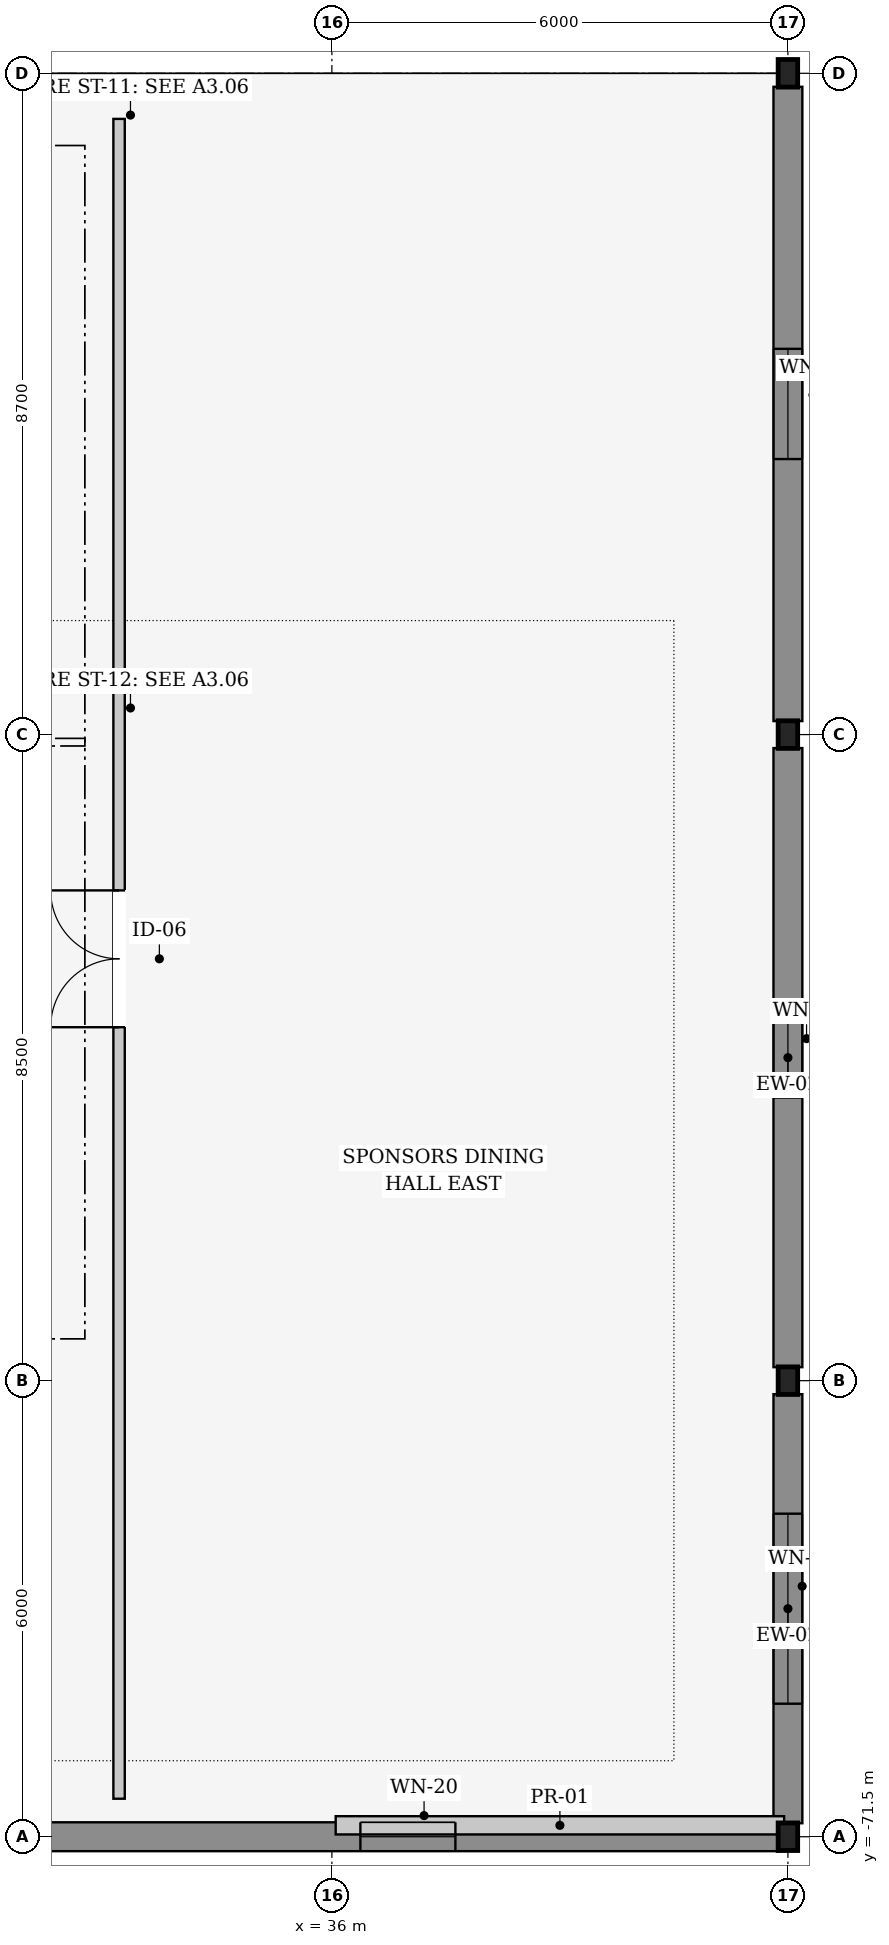
"""IFC4 building model, lengths in metres.
Left out: names, types, materials, properties, quantities, classifications, styles, units other than length and angle.
Written with IfcOpenShell. Run it as: python <this file> out.ifc"""

import sys

from ifc_helpers import new_model, si_unit, direction, frame, frame_2d, origin, origin_2d, place, context, subcontext, project, spatial, rectangle, i_section, extrude, element, fill, save


model = new_model("IFC4")
c1 = context("Model", 3, precision=1e-05, world=origin(), true_north=direction((0.0, 1.0)))
c2 = subcontext(c1, "Body", "Model", "MODEL_VIEW")
j1 = project(units=[si_unit("LENGTHUNIT", "METRE"), si_unit("PLANEANGLEUNIT", "RADIAN")], contexts=[c1])
p1 = place(None, origin())
s1 = spatial("IfcSite", under=j1, at=p1, CompositionType="ELEMENT")
p2 = place(p1, origin())
s2 = spatial("IfcBuilding", under=s1, at=p2, CompositionType="ELEMENT")
p3 = place(p2, frame((0.0, 0.0, 11.4)))
s3 = spatial("IfcBuildingStorey", under=s2, at=p3, CompositionType="ELEMENT", Elevation=11.4)
for number, where, z_axis, x_axis in (
    (1, (42.0, -71.5, 0.0), (0.0, 0.0, 1.0), (1.0, 0.0, 0.0)),
    (2, (42.0, -65.5, 0.0), (0.0, 0.0, 1.0), (1.0, 0.0, 0.0)),
    (3, (42.0, -57.0, 0.0), (0.0, 0.0, 1.0), (1.0, 0.0, 0.0)),
    (4, (42.0, -48.3, 0.0), (0.0, 0.0, 1.0), (1.0, 0.0, 0.0)),
):
    element("IfcColumn", number, at=place(p3, frame(where, z_axis=z_axis, x_axis=x_axis)), inside=s3, PredefinedType="COLUMN", context=c2, shape_type="SweptSolid", body=[
        extrude(i_section(OverallWidth=0.257, OverallDepth=0.363, WebThickness=0.013, FlangeThickness=0.022, at=origin_2d()), origin(), (0.0, 0.0, 1.0), 4.8),
    ])
p4 = place(p3, frame((42.0, -65.677, 0.0), z_axis=(0.0, 0.0, 1.0), x_axis=(0.0, -1.0, 0.0)))
e5 = element("IfcWall", 5, at=p4, inside=s3, PredefinedType="SOLIDWALL", context=c2, shape_type="SweptSolid", body=[
    extrude(rectangle(XDim=5.645, YDim=0.38, at=frame_2d((2.823, 0.0))), origin(), (0.0, 0.0, 1.0), 3.66),
])
p5 = place(p4, frame((1.573, 0.0, 0.95)))
e6 = element("IfcOpeningElement", 6, at=p5, cuts=e5, PredefinedType="OPENING", context=c2, shape_type="SweptSolid", body=[
    extrude(rectangle(XDim=2.5, YDim=1.25, at=frame_2d((1.25, 0.625))), frame((0.0, 0.2, 0.0), z_axis=(0.0, -1.0, 0.0), x_axis=(1.0, 0.0, 0.0)), (0.0, 0.0, 1.0), 0.4),
])
p6 = place(p3, frame((42.0, -57.177, 0.0), z_axis=(0.0, 0.0, 1.0), x_axis=(0.0, -1.0, 0.0)))
e7 = element("IfcWall", 7, at=p6, inside=s3, PredefinedType="SOLIDWALL", context=c2, shape_type="SweptSolid", body=[
    extrude(rectangle(XDim=8.145, YDim=0.38, at=frame_2d((4.073, 0.0))), origin(), (0.0, 0.0, 1.0), 3.66),
])
p7 = place(p6, frame((3.548, 0.0, 0.95)))
e8 = element("IfcOpeningElement", 8, at=p7, cuts=e7, PredefinedType="OPENING", context=c2, shape_type="SweptSolid", body=[
    extrude(rectangle(XDim=1.05, YDim=1.5, at=frame_2d((0.525, 0.75))), frame((0.0, 0.2, 0.0), z_axis=(0.0, -1.0, 0.0), x_axis=(1.0, 0.0, 0.0)), (0.0, 0.0, 1.0), 0.4),
])
p8 = place(p3, frame((42.0, -48.478, 0.0), z_axis=(0.0, 0.0, 1.0), x_axis=(0.0, -1.0, 0.0)))
e9 = element("IfcWall", 9, at=p8, inside=s3, PredefinedType="SOLIDWALL", context=c2, shape_type="SweptSolid", body=[
    extrude(rectangle(XDim=8.345, YDim=0.38, at=frame_2d((4.172, 0.0))), origin(), (0.0, 0.0, 1.0), 3.66),
])
p9 = place(p8, frame((3.448, 0.0, 0.95)))
e10 = element("IfcOpeningElement", 10, at=p9, cuts=e9, PredefinedType="OPENING", context=c2, shape_type="SweptSolid", body=[
    extrude(rectangle(XDim=1.45, YDim=1.5, at=frame_2d((0.725, 0.75))), frame((0.0, 0.2, 0.0), z_axis=(0.0, -1.0, 0.0), x_axis=(1.0, 0.0, 0.0)), (0.0, 0.0, 1.0), 0.4),
])
p10 = place(p3, frame((41.875, -71.5, 0.0), z_axis=(0.0, 0.0, 1.0), x_axis=(-1.0, 0.0, 0.0)))
e11 = element("IfcWall", 11, at=p10, inside=s3, PredefinedType="SOLIDWALL", context=c2, shape_type="SweptSolid", body=[
    extrude(rectangle(XDim=9.751, YDim=0.38, at=frame_2d((4.875, 0.0))), origin(), (0.0, 0.0, 1.0), 3.66),
])
p11 = place(p10, frame((4.25, 0.0, 0.9)))
e12 = element("IfcOpeningElement", 12, at=p11, cuts=e11, PredefinedType="OPENING", context=c2, shape_type="SweptSolid", body=[
    extrude(rectangle(XDim=1.25, YDim=1.75, at=frame_2d((0.625, 0.875))), frame((0.0, 0.2, 0.0), z_axis=(0.0, -1.0, 0.0), x_axis=(1.0, 0.0, 0.0)), (0.0, 0.0, 1.0), 0.4),
])
p12 = place(p3, frame((36.05, -71.35, 4.75), z_axis=(0.0, 0.0, 1.0), x_axis=(1.0, 0.0, 0.0)))
e13 = element("IfcWall", 13, at=p12, inside=s3, PredefinedType="PARAPET", context=c2, shape_type="SweptSolid", body=[
    extrude(rectangle(XDim=5.9, YDim=0.24, at=frame_2d((2.95, 0.0))), origin(), (0.0, 0.0, 1.0), 1.15),
])
p13 = place(p3, frame((33.2, -71.0, 0.0), z_axis=(0.0, 0.0, 1.0), x_axis=(0.0, 1.0, 0.0)))
e14 = element("IfcWall", 14, at=p13, inside=s3, PredefinedType="PARTITIONING", context=c2, shape_type="SweptSolid", body=[
    extrude(rectangle(XDim=22.1, YDim=0.15, at=frame_2d((11.05, 0.0))), origin(), (0.0, 0.0, 1.0), 3.645),
])
p14 = place(p13, frame((10.15, 0.0, 0.0)))
e15 = element("IfcOpeningElement", 15, at=p14, cuts=e14, PredefinedType="OPENING", context=c2, shape_type="SweptSolid", body=[
    extrude(rectangle(XDim=1.8, YDim=2.2, at=frame_2d((0.9, 1.1))), frame((0.0, 0.085, 0.0), z_axis=(0.0, -1.0, 0.0), x_axis=(1.0, 0.0, 0.0)), (0.0, 0.0, 1.0), 0.17),
])
p15 = place(p5, origin())
e16 = element("IfcWindow", 16, at=p15, inside=s3, PartitioningType="SINGLE_PANEL", PredefinedType="WINDOW", context=c2, shape_type="SweptSolid", body=[
    extrude(rectangle(XDim=2.5, YDim=1.25, at=frame_2d((1.25, 0.625))), frame((0.0, 0.03, 0.0), z_axis=(0.0, -1.0, 0.0), x_axis=(1.0, 0.0, 0.0)), (0.0, 0.0, 1.0), 0.06),
])
fill(e6, e16)
p16 = place(p7, origin())
e17 = element("IfcWindow", 17, at=p16, inside=s3, PartitioningType="SINGLE_PANEL", PredefinedType="WINDOW", context=c2, shape_type="SweptSolid", body=[
    extrude(rectangle(XDim=1.05, YDim=1.5, at=frame_2d((0.525, 0.75))), frame((0.0, 0.03, 0.0), z_axis=(0.0, -1.0, 0.0), x_axis=(1.0, 0.0, 0.0)), (0.0, 0.0, 1.0), 0.06),
])
fill(e8, e17)
p17 = place(p9, origin())
e18 = element("IfcWindow", 18, at=p17, inside=s3, PartitioningType="SINGLE_PANEL", PredefinedType="WINDOW", context=c2, shape_type="SweptSolid", body=[
    extrude(rectangle(XDim=1.45, YDim=1.5, at=frame_2d((0.725, 0.75))), frame((0.0, 0.03, 0.0), z_axis=(0.0, -1.0, 0.0), x_axis=(1.0, 0.0, 0.0)), (0.0, 0.0, 1.0), 0.06),
])
fill(e10, e18)
p18 = place(p11, origin())
e19 = element("IfcWindow", 19, at=p18, inside=s3, PartitioningType="SINGLE_PANEL", PredefinedType="WINDOW", context=c2, shape_type="SweptSolid", body=[
    extrude(rectangle(XDim=1.25, YDim=1.75, at=frame_2d((0.625, 0.875))), frame((0.0, 0.03, 0.0), z_axis=(0.0, -1.0, 0.0), x_axis=(1.0, 0.0, 0.0)), (0.0, 0.0, 1.0), 0.06),
])
fill(e12, e19)
p19 = place(p14, origin())
e20 = element("IfcDoor", 20, at=p19, inside=s3, OperationType="DOUBLE_DOOR_SINGLE_SWING", PredefinedType="DOOR", context=c2, shape_type="SweptSolid", body=[
    extrude(rectangle(XDim=1.8, YDim=2.2, at=frame_2d((0.9, 1.1))), frame((0.0, 0.025, 0.0), z_axis=(0.0, -1.0, 0.0), x_axis=(1.0, 0.0, 0.0)), (0.0, 0.0, 1.0), 0.05),
])
fill(e15, e20)
save(model, sys.argv[1])
